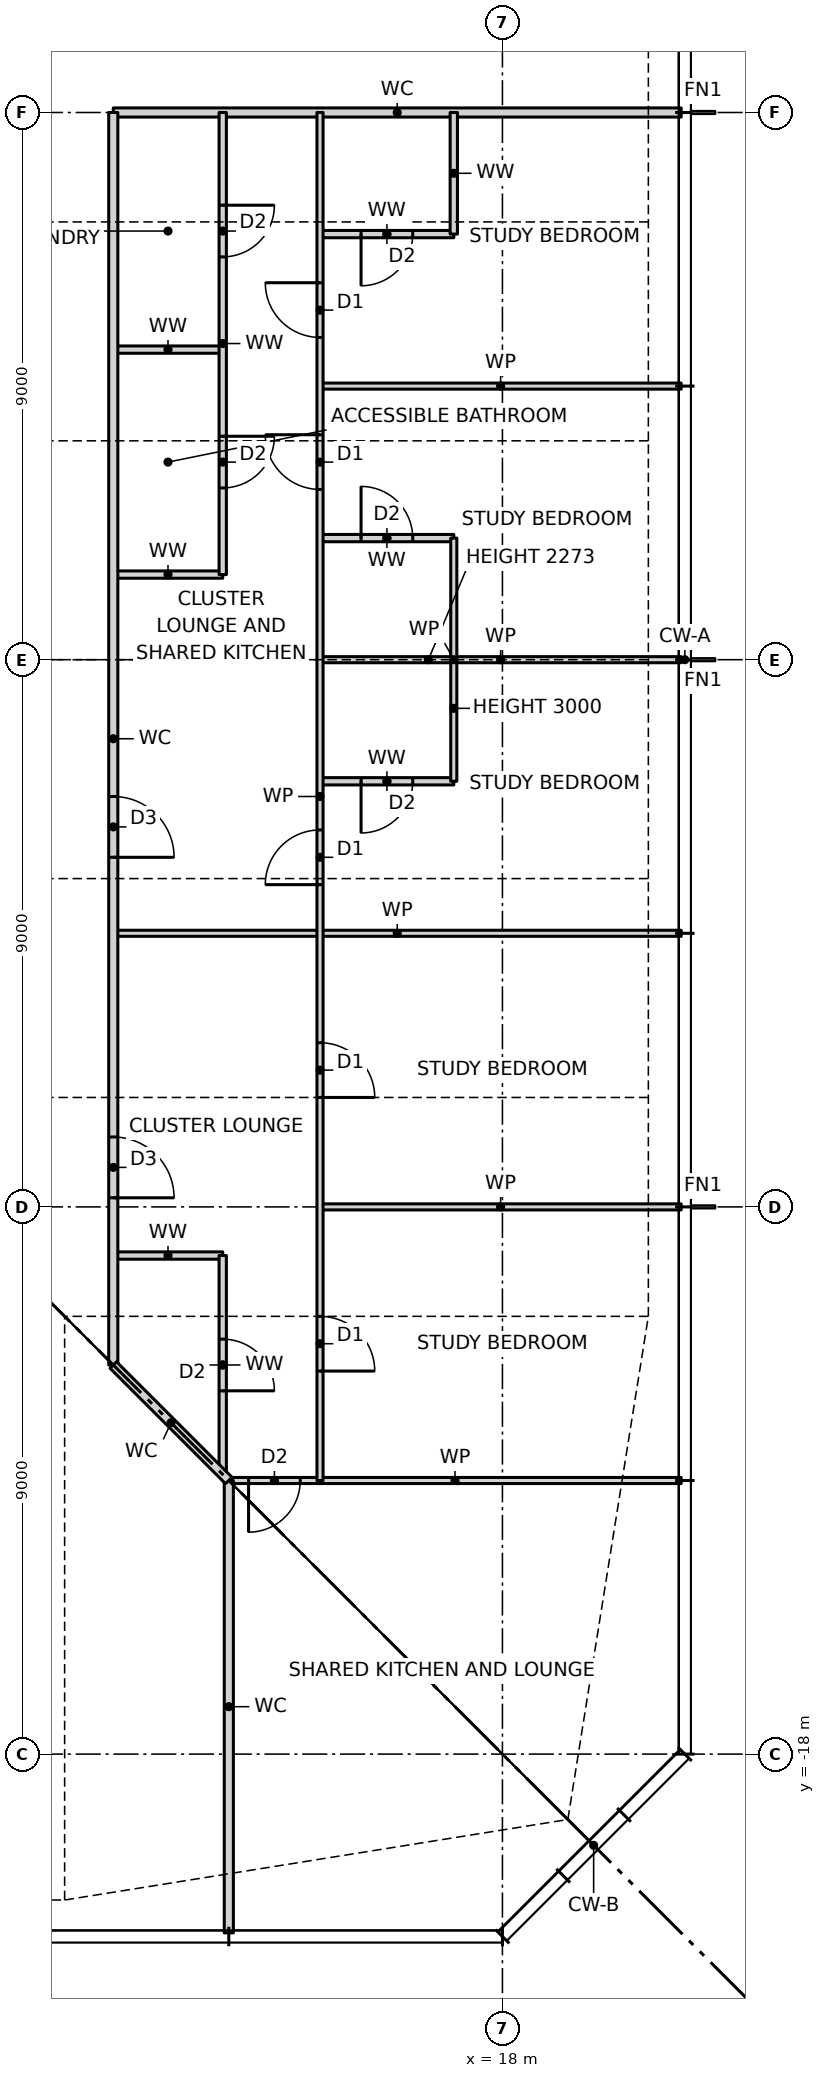
"""IFC4 building model, lengths in metres.
Left out: names, types, materials, properties, quantities, classifications, styles, units other than length and angle.
Written with IfcOpenShell. Run it as: python <this file> out.ifc"""

import sys

from ifc_helpers import new_model, si_unit, direction, frame, frame_2d, origin, place, context, subcontext, project, spatial, rectangle, extrude, element, fill, save


model = new_model("IFC4")
c1 = context("Model", 3, precision=1e-05, world=origin(), true_north=direction((0.0, 1.0)))
c2 = subcontext(c1, "Body", "Model", "MODEL_VIEW")
j1 = project(units=[si_unit("LENGTHUNIT", "METRE"), si_unit("PLANEANGLEUNIT", "RADIAN")], contexts=[c1])
p1 = place(None, origin())
s1 = spatial("IfcSite", under=j1, at=p1, CompositionType="ELEMENT")
p2 = place(p1, origin())
s2 = spatial("IfcBuilding", under=s1, at=p2, CompositionType="ELEMENT")
p3 = place(p2, frame((0.0, 0.0, 140.0)))
s3 = spatial("IfcBuildingStorey", under=s2, at=p3, CompositionType="ELEMENT", Elevation=140.0)
p4 = place(p3, frame((13.5, -13.5, 0.0), z_axis=(0.0, 0.0, 1.0), x_axis=(1.0, 0.0, 0.0)))
e1 = element("IfcWall", 1, at=p4, inside=s3, PredefinedType="PARTITIONING", context=c2, shape_type="SweptSolid", body=[
    extrude(rectangle(XDim=7.44, YDim=0.1, at=frame_2d((3.72, 0.0))), origin(), (0.0, 0.0, 1.0), 3.2),
])
p5 = place(p4, frame((0.325, 0.0, 0.0)))
e2 = element("IfcOpeningElement", 2, at=p5, cuts=e1, PredefinedType="OPENING", context=c2, shape_type="SweptSolid", body=[
    extrude(rectangle(XDim=0.85, YDim=2.1, at=frame_2d((0.425, 1.05))), frame((0.0, 0.06, 0.0), z_axis=(0.0, -1.0, 0.0), x_axis=(1.0, 0.0, 0.0)), (0.0, 0.0, 1.0), 0.12),
])
p6 = place(p3, frame((11.6, -9.8, 0.0), z_axis=(0.0, 0.0, 1.0), x_axis=(1.0, 0.0, 0.0)))
e3 = element("IfcWall", 3, at=p6, inside=s3, PredefinedType="PARTITIONING", context=c2, shape_type="SweptSolid", body=[
    extrude(rectangle(XDim=1.8, YDim=0.12, at=frame_2d((0.9, 0.0))), origin(), (0.0, 0.0, 1.0), 3.2),
])
p7 = place(p3, frame((15.0, -9.0, 0.0), z_axis=(0.0, 0.0, 1.0), x_axis=(1.0, 0.0, 0.0)))
e4 = element("IfcWall", 4, at=p7, inside=s3, PredefinedType="PARTITIONING", context=c2, shape_type="SweptSolid", body=[
    extrude(rectangle(XDim=5.94, YDim=0.1, at=frame_2d((2.97, 0.0))), origin(), (0.0, 0.0, 1.0), 3.2),
])
p8 = place(p3, frame((11.6, -4.5, 0.0), z_axis=(0.0, 0.0, 1.0), x_axis=(1.0, 0.0, 0.0)))
e5 = element("IfcWall", 5, at=p8, inside=s3, PredefinedType="PARTITIONING", context=c2, shape_type="SweptSolid", body=[
    extrude(rectangle(XDim=9.34, YDim=0.1, at=frame_2d((4.67, 0.0))), origin(), (0.0, 0.0, 1.0), 3.2),
])
p9 = place(p3, frame((15.0, -2.0, 0.0), z_axis=(0.0, 0.0, 1.0), x_axis=(1.0, 0.0, 0.0)))
e6 = element("IfcWall", 6, at=p9, inside=s3, PredefinedType="PARTITIONING", context=c2, shape_type="SweptSolid", body=[
    extrude(rectangle(XDim=2.2, YDim=0.12, at=frame_2d((1.1, 0.0))), origin(), (0.0, 0.0, 1.0), 3.2),
])
p10 = place(p9, frame((0.675, 0.0, 0.0)))
e7 = element("IfcOpeningElement", 7, at=p10, cuts=e6, PredefinedType="OPENING", context=c2, shape_type="SweptSolid", body=[
    extrude(rectangle(XDim=0.85, YDim=2.1, at=frame_2d((0.425, 1.05))), frame((0.0, 0.07, 0.0), z_axis=(0.0, -1.0, 0.0), x_axis=(1.0, 0.0, 0.0)), (0.0, 0.0, 1.0), 0.14),
])
p11 = place(p3, frame((15.0, 0.0, 0.0), z_axis=(0.0, 0.0, 1.0), x_axis=(1.0, 0.0, 0.0)))
e8 = element("IfcWall", 8, at=p11, inside=s3, PredefinedType="PARTITIONING", context=c2, shape_type="SweptSolid", body=[
    extrude(rectangle(XDim=5.94, YDim=0.1, at=frame_2d((2.97, 0.0))), origin(), (0.0, 0.0, 1.0), 2.273),
])
p12 = place(p3, frame((11.6, 1.4, 0.0), z_axis=(0.0, 0.0, 1.0), x_axis=(1.0, 0.0, 0.0)))
e9 = element("IfcWall", 9, at=p12, inside=s3, PredefinedType="PARTITIONING", context=c2, shape_type="SweptSolid", body=[
    extrude(rectangle(XDim=1.8, YDim=0.12, at=frame_2d((0.9, 0.0))), origin(), (0.0, 0.0, 1.0), 3.2),
])
p13 = place(p3, frame((15.0, 2.0, 0.0), z_axis=(0.0, 0.0, 1.0), x_axis=(1.0, 0.0, 0.0)))
e10 = element("IfcWall", 10, at=p13, inside=s3, PredefinedType="PARTITIONING", context=c2, shape_type="SweptSolid", body=[
    extrude(rectangle(XDim=2.2, YDim=0.12, at=frame_2d((1.1, 0.0))), origin(), (0.0, 0.0, 1.0), 3.2),
])
p14 = place(p13, frame((0.675, 0.0, 0.0)))
e11 = element("IfcOpeningElement", 11, at=p14, cuts=e10, PredefinedType="OPENING", context=c2, shape_type="SweptSolid", body=[
    extrude(rectangle(XDim=0.85, YDim=2.1, at=frame_2d((0.425, 1.05))), frame((0.0, 0.07, 0.0), z_axis=(0.0, -1.0, 0.0), x_axis=(1.0, 0.0, 0.0)), (0.0, 0.0, 1.0), 0.14),
])
p15 = place(p3, frame((15.0, 4.5, 0.0), z_axis=(0.0, 0.0, 1.0), x_axis=(1.0, 0.0, 0.0)))
e12 = element("IfcWall", 12, at=p15, inside=s3, PredefinedType="PARTITIONING", context=c2, shape_type="SweptSolid", body=[
    extrude(rectangle(XDim=5.94, YDim=0.1, at=frame_2d((2.97, 0.0))), origin(), (0.0, 0.0, 1.0), 3.2),
])
p16 = place(p3, frame((11.6, 5.1, 0.0), z_axis=(0.0, 0.0, 1.0), x_axis=(1.0, 0.0, 0.0)))
e13 = element("IfcWall", 13, at=p16, inside=s3, PredefinedType="PARTITIONING", context=c2, shape_type="SweptSolid", body=[
    extrude(rectangle(XDim=1.8, YDim=0.12, at=frame_2d((0.9, 0.0))), origin(), (0.0, 0.0, 1.0), 3.2),
])
p17 = place(p3, frame((15.0, 7.0, 0.0), z_axis=(0.0, 0.0, 1.0), x_axis=(1.0, 0.0, 0.0)))
e14 = element("IfcWall", 14, at=p17, inside=s3, PredefinedType="PARTITIONING", context=c2, shape_type="SweptSolid", body=[
    extrude(rectangle(XDim=2.2, YDim=0.12, at=frame_2d((1.1, 0.0))), origin(), (0.0, 0.0, 1.0), 3.2),
])
p18 = place(p17, frame((0.675, 0.0, 0.0)))
e15 = element("IfcOpeningElement", 15, at=p18, cuts=e14, PredefinedType="OPENING", context=c2, shape_type="SweptSolid", body=[
    extrude(rectangle(XDim=0.85, YDim=2.1, at=frame_2d((0.425, 1.05))), frame((0.0, 0.07, 0.0), z_axis=(0.0, -1.0, 0.0), x_axis=(1.0, 0.0, 0.0)), (0.0, 0.0, 1.0), 0.14),
])
p19 = place(p3, frame((11.6, 9.0, 0.0), z_axis=(0.0, 0.0, 1.0), x_axis=(1.0, 0.0, 0.0)))
e16 = element("IfcWall", 16, at=p19, inside=s3, PredefinedType="PARTITIONING", context=c2, shape_type="SweptSolid", body=[
    extrude(rectangle(XDim=9.34, YDim=0.15, at=frame_2d((4.67, 0.0))), origin(), (0.0, 0.0, 1.0), 3.2),
])
p20 = place(p3, frame((17.2, -2.0, 0.0), z_axis=(0.0, 0.0, 1.0), x_axis=(0.0, 1.0, 0.0)))
e17 = element("IfcWall", 17, at=p20, inside=s3, PredefinedType="PARTITIONING", context=c2, shape_type="SweptSolid", body=[
    extrude(rectangle(XDim=4.0, YDim=0.1, at=frame_2d((2.0, 0.0))), origin(), (0.0, 0.0, 1.0), 3.0),
])
p21 = place(p3, frame((17.2, 7.0, 0.0), z_axis=(0.0, 0.0, 1.0), x_axis=(0.0, 1.0, 0.0)))
e18 = element("IfcWall", 18, at=p21, inside=s3, PredefinedType="PARTITIONING", context=c2, shape_type="SweptSolid", body=[
    extrude(rectangle(XDim=2.0, YDim=0.12, at=frame_2d((1.0, 0.0))), origin(), (0.0, 0.0, 1.0), 3.2),
])
p22 = place(p3, frame((15.0, -13.5, 0.0), z_axis=(0.0, 0.0, 1.0), x_axis=(0.0, 1.0, 0.0)))
e19 = element("IfcWall", 19, at=p22, inside=s3, PredefinedType="PARTITIONING", context=c2, shape_type="SweptSolid", body=[
    extrude(rectangle(XDim=22.5, YDim=0.1, at=frame_2d((11.25, 0.0))), origin(), (0.0, 0.0, 1.0), 3.2),
])
p23 = place(p22, frame((1.8, 0.0, 0.0)))
e20 = element("IfcOpeningElement", 20, at=p23, cuts=e19, PredefinedType="OPENING", context=c2, shape_type="SweptSolid", body=[
    extrude(rectangle(XDim=0.9, YDim=2.1, at=frame_2d((0.45, 1.05))), frame((0.0, 0.06, 0.0), z_axis=(0.0, -1.0, 0.0), x_axis=(1.0, 0.0, 0.0)), (0.0, 0.0, 1.0), 0.12),
])
p24 = place(p22, frame((6.3, 0.0, 0.0)))
e21 = element("IfcOpeningElement", 21, at=p24, cuts=e19, PredefinedType="OPENING", context=c2, shape_type="SweptSolid", body=[
    extrude(rectangle(XDim=0.9, YDim=2.1, at=frame_2d((0.45, 1.05))), frame((0.0, 0.06, 0.0), z_axis=(0.0, -1.0, 0.0), x_axis=(1.0, 0.0, 0.0)), (0.0, 0.0, 1.0), 0.12),
])
p25 = place(p22, frame((9.8, 0.0, 0.0)))
e22 = element("IfcOpeningElement", 22, at=p25, cuts=e19, PredefinedType="OPENING", context=c2, shape_type="SweptSolid", body=[
    extrude(rectangle(XDim=0.9, YDim=2.1, at=frame_2d((0.45, 1.05))), frame((0.0, 0.06, 0.0), z_axis=(0.0, -1.0, 0.0), x_axis=(1.0, 0.0, 0.0)), (0.0, 0.0, 1.0), 0.12),
])
p26 = place(p22, frame((16.3, 0.0, 0.0)))
e23 = element("IfcOpeningElement", 23, at=p26, cuts=e19, PredefinedType="OPENING", context=c2, shape_type="SweptSolid", body=[
    extrude(rectangle(XDim=0.9, YDim=2.1, at=frame_2d((0.45, 1.05))), frame((0.0, 0.06, 0.0), z_axis=(0.0, -1.0, 0.0), x_axis=(1.0, 0.0, 0.0)), (0.0, 0.0, 1.0), 0.12),
])
p27 = place(p22, frame((18.8, 0.0, 0.0)))
e24 = element("IfcOpeningElement", 24, at=p27, cuts=e19, PredefinedType="OPENING", context=c2, shape_type="SweptSolid", body=[
    extrude(rectangle(XDim=0.9, YDim=2.1, at=frame_2d((0.45, 1.05))), frame((0.0, 0.06, 0.0), z_axis=(0.0, -1.0, 0.0), x_axis=(1.0, 0.0, 0.0)), (0.0, 0.0, 1.0), 0.12),
])
p28 = place(p3, frame((13.5, -20.94, 0.0), z_axis=(0.0, 0.0, 1.0), x_axis=(0.0, 1.0, 0.0)))
e25 = element("IfcWall", 25, at=p28, inside=s3, PredefinedType="PARTITIONING", context=c2, shape_type="SweptSolid", body=[
    extrude(rectangle(XDim=7.44, YDim=0.15, at=frame_2d((3.72, 0.0))), origin(), (0.0, 0.0, 1.0), 3.2),
])
p29 = place(p3, frame((13.4, -13.4, 0.0), z_axis=(0.0, 0.0, 1.0), x_axis=(0.0, 1.0, 0.0)))
e26 = element("IfcWall", 26, at=p29, inside=s3, PredefinedType="PARTITIONING", context=c2, shape_type="SweptSolid", body=[
    extrude(rectangle(XDim=3.6, YDim=0.12, at=frame_2d((1.8, 0.0))), origin(), (0.0, 0.0, 1.0), 3.2),
])
p30 = place(p29, frame((1.375, 0.0, 0.0)))
e27 = element("IfcOpeningElement", 27, at=p30, cuts=e26, PredefinedType="OPENING", context=c2, shape_type="SweptSolid", body=[
    extrude(rectangle(XDim=0.85, YDim=2.1, at=frame_2d((0.425, 1.05))), frame((0.0, 0.07, 0.0), z_axis=(0.0, -1.0, 0.0), x_axis=(1.0, 0.0, 0.0)), (0.0, 0.0, 1.0), 0.14),
])
p31 = place(p3, frame((13.4, 1.4, 0.0), z_axis=(0.0, 0.0, 1.0), x_axis=(0.0, 1.0, 0.0)))
e28 = element("IfcWall", 28, at=p31, inside=s3, PredefinedType="PARTITIONING", context=c2, shape_type="SweptSolid", body=[
    extrude(rectangle(XDim=7.6, YDim=0.12, at=frame_2d((3.8, 0.0))), origin(), (0.0, 0.0, 1.0), 3.2),
])
p32 = place(p31, frame((1.425, 0.0, 0.0)))
e29 = element("IfcOpeningElement", 29, at=p32, cuts=e28, PredefinedType="OPENING", context=c2, shape_type="SweptSolid", body=[
    extrude(rectangle(XDim=0.85, YDim=2.1, at=frame_2d((0.425, 1.05))), frame((0.0, 0.07, 0.0), z_axis=(0.0, -1.0, 0.0), x_axis=(1.0, 0.0, 0.0)), (0.0, 0.0, 1.0), 0.14),
])
p33 = place(p31, frame((5.225, 0.0, 0.0)))
e30 = element("IfcOpeningElement", 30, at=p33, cuts=e28, PredefinedType="OPENING", context=c2, shape_type="SweptSolid", body=[
    extrude(rectangle(XDim=0.85, YDim=2.1, at=frame_2d((0.425, 1.05))), frame((0.0, 0.07, 0.0), z_axis=(0.0, -1.0, 0.0), x_axis=(1.0, 0.0, 0.0)), (0.0, 0.0, 1.0), 0.14),
])
p34 = place(p3, frame((11.6, -11.6, 0.0), z_axis=(0.0, 0.0, 1.0), x_axis=(0.0, 1.0, 0.0)))
e31 = element("IfcWall", 31, at=p34, inside=s3, PredefinedType="PARTITIONING", context=c2, shape_type="SweptSolid", body=[
    extrude(rectangle(XDim=20.6, YDim=0.15, at=frame_2d((10.3, 0.0))), origin(), (0.0, 0.0, 1.0), 3.2),
])
p35 = place(p34, frame((2.75, 0.0, 0.0)))
e32 = element("IfcOpeningElement", 32, at=p35, cuts=e31, PredefinedType="OPENING", context=c2, shape_type="SweptSolid", body=[
    extrude(rectangle(XDim=1.0, YDim=2.1, at=frame_2d((0.5, 1.05))), frame((0.0, 0.085, 0.0), z_axis=(0.0, -1.0, 0.0), x_axis=(1.0, 0.0, 0.0)), (0.0, 0.0, 1.0), 0.17),
])
p36 = place(p34, frame((8.35, 0.0, 0.0)))
e33 = element("IfcOpeningElement", 33, at=p36, cuts=e31, PredefinedType="OPENING", context=c2, shape_type="SweptSolid", body=[
    extrude(rectangle(XDim=1.0, YDim=2.1, at=frame_2d((0.5, 1.05))), frame((0.0, 0.085, 0.0), z_axis=(0.0, -1.0, 0.0), x_axis=(1.0, 0.0, 0.0)), (0.0, 0.0, 1.0), 0.17),
])
p37 = place(p3, frame((13.5, -13.5, 0.0), z_axis=(0.0, 0.0, 1.0), x_axis=(-0.707106781187, 0.707106781187, 0.0)))
e34 = element("IfcWall", 34, at=p37, inside=s3, PredefinedType="PARTITIONING", context=c2, shape_type="SweptSolid", body=[
    extrude(rectangle(XDim=2.687, YDim=0.15, at=frame_2d((1.343, 0.0))), origin(), (0.0, 0.0, 1.0), 3.2),
])
p38 = place(p23, frame((0.9, 0.0, 0.0), z_axis=(0.0, 0.0, 1.0), x_axis=(-1.0, 0.0, 0.0)))
e35 = element("IfcDoor", 35, at=p38, inside=s3, OperationType="SINGLE_SWING_RIGHT", PredefinedType="DOOR", context=c2, shape_type="SweptSolid", body=[
    extrude(rectangle(XDim=0.9, YDim=2.1, at=frame_2d((0.45, 1.05))), frame((0.0, 0.025, 0.0), z_axis=(0.0, -1.0, 0.0), x_axis=(1.0, 0.0, 0.0)), (0.0, 0.0, 1.0), 0.05),
])
fill(e20, e35)
p39 = place(p24, frame((0.9, 0.0, 0.0), z_axis=(0.0, 0.0, 1.0), x_axis=(-1.0, 0.0, 0.0)))
e36 = element("IfcDoor", 36, at=p39, inside=s3, OperationType="SINGLE_SWING_RIGHT", PredefinedType="DOOR", context=c2, shape_type="SweptSolid", body=[
    extrude(rectangle(XDim=0.9, YDim=2.1, at=frame_2d((0.45, 1.05))), frame((0.0, 0.025, 0.0), z_axis=(0.0, -1.0, 0.0), x_axis=(1.0, 0.0, 0.0)), (0.0, 0.0, 1.0), 0.05),
])
fill(e21, e36)
p40 = place(p35, frame((1.0, 0.0, 0.0), z_axis=(0.0, 0.0, 1.0), x_axis=(-1.0, 0.0, 0.0)))
e37 = element("IfcDoor", 37, at=p40, inside=s3, OperationType="SINGLE_SWING_RIGHT", PredefinedType="DOOR", context=c2, shape_type="SweptSolid", body=[
    extrude(rectangle(XDim=1.0, YDim=2.1, at=frame_2d((0.5, 1.05))), frame((0.0, 0.025, 0.0), z_axis=(0.0, -1.0, 0.0), x_axis=(1.0, 0.0, 0.0)), (0.0, 0.0, 1.0), 0.05),
])
fill(e32, e37)
p41 = place(p30, frame((0.85, 0.0, 0.0), z_axis=(0.0, 0.0, 1.0), x_axis=(-1.0, 0.0, 0.0)))
e38 = element("IfcDoor", 38, at=p41, inside=s3, OperationType="SINGLE_SWING_RIGHT", PredefinedType="DOOR", context=c2, shape_type="SweptSolid", body=[
    extrude(rectangle(XDim=0.85, YDim=2.1, at=frame_2d((0.425, 1.05))), frame((0.0, 0.025, 0.0), z_axis=(0.0, -1.0, 0.0), x_axis=(1.0, 0.0, 0.0)), (0.0, 0.0, 1.0), 0.05),
])
fill(e27, e38)
p42 = place(p10, frame((0.85, 0.0, 0.0), z_axis=(0.0, 0.0, 1.0), x_axis=(-1.0, 0.0, 0.0)))
e39 = element("IfcDoor", 39, at=p42, inside=s3, OperationType="SINGLE_SWING_RIGHT", PredefinedType="DOOR", context=c2, shape_type="SweptSolid", body=[
    extrude(rectangle(XDim=0.85, YDim=2.1, at=frame_2d((0.425, 1.05))), frame((0.0, 0.025, 0.0), z_axis=(0.0, -1.0, 0.0), x_axis=(1.0, 0.0, 0.0)), (0.0, 0.0, 1.0), 0.05),
])
fill(e7, e39)
p43 = place(p25, origin())
e40 = element("IfcDoor", 40, at=p43, inside=s3, OperationType="SINGLE_SWING_LEFT", PredefinedType="DOOR", context=c2, shape_type="SweptSolid", body=[
    extrude(rectangle(XDim=0.9, YDim=2.1, at=frame_2d((0.45, 1.05))), frame((0.0, 0.025, 0.0), z_axis=(0.0, -1.0, 0.0), x_axis=(1.0, 0.0, 0.0)), (0.0, 0.0, 1.0), 0.05),
])
fill(e22, e40)
p44 = place(p14, origin())
e41 = element("IfcDoor", 41, at=p44, inside=s3, OperationType="SINGLE_SWING_LEFT", PredefinedType="DOOR", context=c2, shape_type="SweptSolid", body=[
    extrude(rectangle(XDim=0.85, YDim=2.1, at=frame_2d((0.425, 1.05))), frame((0.0, 0.025, 0.0), z_axis=(0.0, -1.0, 0.0), x_axis=(1.0, 0.0, 0.0)), (0.0, 0.0, 1.0), 0.05),
])
fill(e11, e41)
p45 = place(p26, origin())
e42 = element("IfcDoor", 42, at=p45, inside=s3, OperationType="SINGLE_SWING_RIGHT", PredefinedType="DOOR", context=c2, shape_type="SweptSolid", body=[
    extrude(rectangle(XDim=0.9, YDim=2.1, at=frame_2d((0.45, 1.05))), frame((0.0, 0.025, 0.0), z_axis=(0.0, -1.0, 0.0), x_axis=(1.0, 0.0, 0.0)), (0.0, 0.0, 1.0), 0.05),
])
fill(e23, e42)
p46 = place(p18, frame((0.85, 0.0, 0.0), z_axis=(0.0, 0.0, 1.0), x_axis=(-1.0, 0.0, 0.0)))
e43 = element("IfcDoor", 43, at=p46, inside=s3, OperationType="SINGLE_SWING_RIGHT", PredefinedType="DOOR", context=c2, shape_type="SweptSolid", body=[
    extrude(rectangle(XDim=0.85, YDim=2.1, at=frame_2d((0.425, 1.05))), frame((0.0, 0.025, 0.0), z_axis=(0.0, -1.0, 0.0), x_axis=(1.0, 0.0, 0.0)), (0.0, 0.0, 1.0), 0.05),
])
fill(e15, e43)
p47 = place(p27, origin())
e44 = element("IfcDoor", 44, at=p47, inside=s3, OperationType="SINGLE_SWING_RIGHT", PredefinedType="DOOR", context=c2, shape_type="SweptSolid", body=[
    extrude(rectangle(XDim=0.9, YDim=2.1, at=frame_2d((0.45, 1.05))), frame((0.0, 0.025, 0.0), z_axis=(0.0, -1.0, 0.0), x_axis=(1.0, 0.0, 0.0)), (0.0, 0.0, 1.0), 0.05),
])
fill(e24, e44)
p48 = place(p36, frame((1.0, 0.0, 0.0), z_axis=(0.0, 0.0, 1.0), x_axis=(-1.0, 0.0, 0.0)))
e45 = element("IfcDoor", 45, at=p48, inside=s3, OperationType="SINGLE_SWING_RIGHT", PredefinedType="DOOR", context=c2, shape_type="SweptSolid", body=[
    extrude(rectangle(XDim=1.0, YDim=2.1, at=frame_2d((0.5, 1.05))), frame((0.0, 0.025, 0.0), z_axis=(0.0, -1.0, 0.0), x_axis=(1.0, 0.0, 0.0)), (0.0, 0.0, 1.0), 0.05),
])
fill(e33, e45)
p49 = place(p32, frame((0.85, 0.0, 0.0), z_axis=(0.0, 0.0, 1.0), x_axis=(-1.0, 0.0, 0.0)))
e46 = element("IfcDoor", 46, at=p49, inside=s3, OperationType="SINGLE_SWING_LEFT", PredefinedType="DOOR", context=c2, shape_type="SweptSolid", body=[
    extrude(rectangle(XDim=0.85, YDim=2.1, at=frame_2d((0.425, 1.05))), frame((0.0, 0.025, 0.0), z_axis=(0.0, -1.0, 0.0), x_axis=(1.0, 0.0, 0.0)), (0.0, 0.0, 1.0), 0.05),
])
fill(e29, e46)
p50 = place(p33, frame((0.85, 0.0, 0.0), z_axis=(0.0, 0.0, 1.0), x_axis=(-1.0, 0.0, 0.0)))
e47 = element("IfcDoor", 47, at=p50, inside=s3, OperationType="SINGLE_SWING_LEFT", PredefinedType="DOOR", context=c2, shape_type="SweptSolid", body=[
    extrude(rectangle(XDim=0.85, YDim=2.1, at=frame_2d((0.425, 1.05))), frame((0.0, 0.025, 0.0), z_axis=(0.0, -1.0, 0.0), x_axis=(1.0, 0.0, 0.0)), (0.0, 0.0, 1.0), 0.05),
])
fill(e30, e47)
p51 = place(p5, frame((0.85, 0.0, 0.0), z_axis=(0.0, 0.0, 1.0), x_axis=(-1.0, 0.0, 0.0)))
e48 = element("IfcDoor", 48, at=p51, inside=s3, OperationType="SINGLE_SWING_RIGHT", PredefinedType="DOOR", context=c2, shape_type="SweptSolid", body=[
    extrude(rectangle(XDim=0.85, YDim=2.1, at=frame_2d((0.425, 1.05))), frame((0.0, 0.025, 0.0), z_axis=(0.0, -1.0, 0.0), x_axis=(1.0, 0.0, 0.0)), (0.0, 0.0, 1.0), 0.05),
])
fill(e2, e48)
save(model, sys.argv[1])
